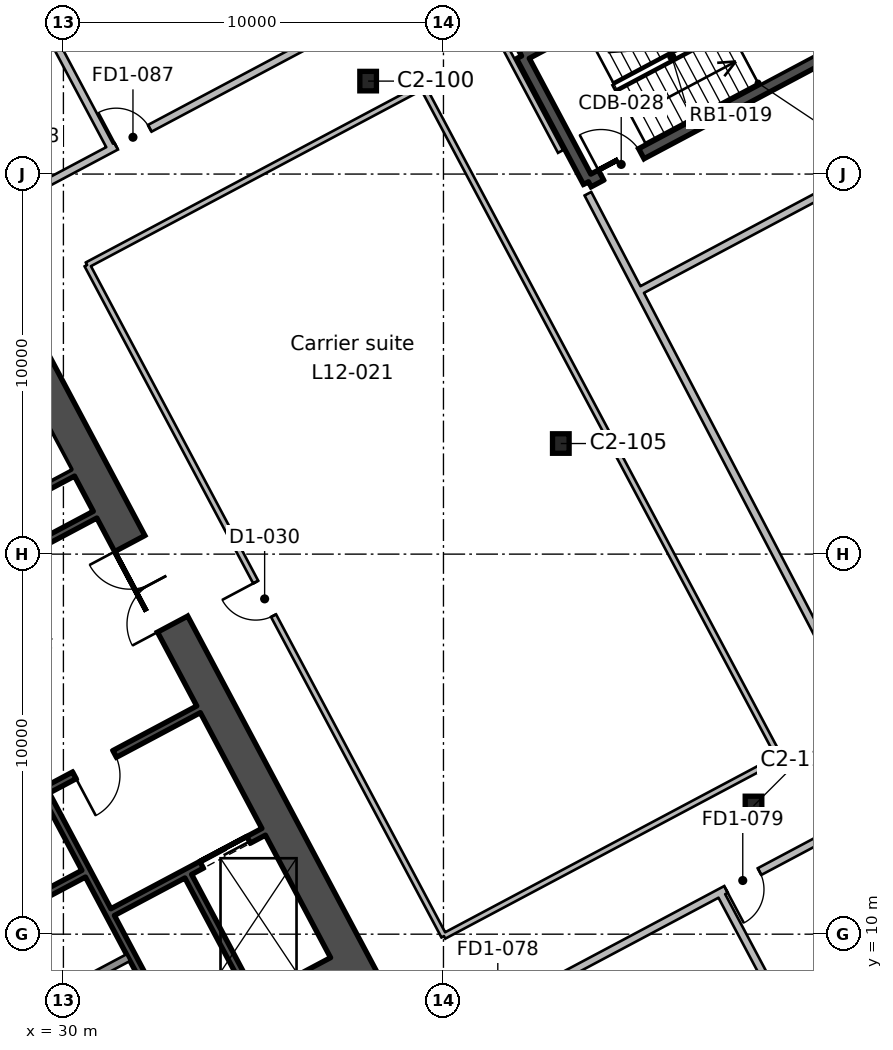
"""IFC4 building model, lengths in metres.
Left out: names, types, materials, properties, quantities, classifications, styles, units other than length and angle.
Written with IfcOpenShell. Run it as: python <this file> out.ifc"""

import sys

from ifc_helpers import new_model, si_unit, direction, frame, frame_2d, origin, origin_2d, place, context, subcontext, project, spatial, rectangle, i_section, extrude, element, fill, save


model = new_model("IFC4")
c1 = context("Model", 3, precision=1e-05, world=origin(), true_north=direction((0.0, 1.0)))
c2 = subcontext(c1, "Body", "Model", "MODEL_VIEW")
j1 = project(units=[si_unit("LENGTHUNIT", "METRE"), si_unit("PLANEANGLEUNIT", "RADIAN")], contexts=[c1])
p1 = place(None, origin())
s1 = spatial("IfcSite", under=j1, at=p1, CompositionType="ELEMENT")
p2 = place(p1, origin())
s2 = spatial("IfcBuilding", under=s1, at=p2, CompositionType="ELEMENT")
p3 = place(p2, frame((0.0, 0.0, 66.2)))
s3 = spatial("IfcBuildingStorey", under=s2, at=p3, CompositionType="ELEMENT", Elevation=66.2)
for number, where, z_axis, x_axis in (
    (1, (48.158, 13.374, 0.0), (0.0, 0.0, 1.0), (1.0, 0.0, 0.0)),
    (2, (43.088, 22.91, 0.0), (0.0, 0.0, 1.0), (1.0, 0.0, 0.0)),
    (3, (38.018, 32.446, 0.0), (0.0, 0.0, 1.0), (1.0, 0.0, 0.0)),
):
    element("IfcColumn", number, at=place(p3, frame(where, z_axis=z_axis, x_axis=x_axis)), inside=s3, PredefinedType="COLUMN", context=c2, shape_type="SweptSolid", body=[
        extrude(i_section(OverallWidth=0.437, OverallDepth=0.513, WebThickness=0.061, FlangeThickness=0.097, FilletRadius=0.015, at=origin_2d()), origin(), (0.0, 0.0, 1.0), 4.6),
    ])
p4 = place(p3, frame((37.849, 8.799, 0.0), z_axis=(0.0, 0.0, 1.0), x_axis=(-0.469465789982, 0.882950662289, 0.0)))
e4 = element("IfcWall", 4, at=p4, inside=s3, PredefinedType="SHEAR", context=c2, shape_type="SweptSolid", body=[
    extrude(rectangle(XDim=20.0, YDim=0.9, at=frame_2d((10.0, 0.0))), origin(), (0.0, 0.0, 1.0), 4.6),
])
p5 = place(p4, frame((10.6, 0.0, 0.0)))
e5 = element("IfcOpeningElement", 5, at=p5, cuts=e4, PredefinedType="OPENING", context=c2, shape_type="SweptSolid", body=[
    extrude(rectangle(XDim=2.4, YDim=2.4, at=frame_2d((1.2, 1.2))), frame((0.0, 0.46, 0.0), z_axis=(0.0, -1.0, 0.0), x_axis=(1.0, 0.0, 0.0)), (0.0, 0.0, 1.0), 0.92),
])
p6 = place(p3, frame((19.405, -0.498, 0.0), z_axis=(0.0, 0.0, 1.0), x_axis=(0.88294509198, 0.469476266226, 0.0)))
e6 = element("IfcWall", 6, at=p6, inside=s3, PredefinedType="SHEAR", context=c2, shape_type="SweptSolid", body=[
    extrude(rectangle(XDim=20.2, YDim=0.9, at=frame_2d((10.1, 0.0))), origin(), (0.0, 0.0, 1.0), 4.6),
])
p7 = place(p3, frame((32.968, 7.223, 0.0), z_axis=(0.0, 0.0, 1.0), x_axis=(-0.469480409012, 0.88294288918, 0.0)))
e7 = element("IfcWall", 7, at=p7, inside=s3, PredefinedType="SHEAR", context=c2, shape_type="SweptSolid", body=[
    extrude(rectangle(XDim=7.3, YDim=0.2, at=frame_2d((3.65, 0.0))), origin(), (0.0, 0.0, 1.0), 4.6),
])
p8 = place(p3, frame((34.999, 8.303, 0.0), z_axis=(0.0, 0.0, 1.0), x_axis=(-0.4694665462, 0.882950260207, 0.0)))
e8 = element("IfcWall", 8, at=p8, inside=s3, PredefinedType="SHEAR", context=c2, shape_type="SweptSolid", body=[
    extrude(rectangle(XDim=3.65, YDim=0.2, at=frame_2d((1.825, 0.0))), origin(), (0.0, 0.0, 1.0), 4.6),
])
p9 = place(p3, frame((27.115, 6.942, 0.0), z_axis=(0.0, 0.0, 1.0), x_axis=(0.882934506056, 0.469496174655, 0.0)))
e9 = element("IfcWall", 9, at=p9, inside=s3, PredefinedType="SOLIDWALL", context=c2, shape_type="SweptSolid", body=[
    extrude(rectangle(XDim=5.2, YDim=0.2, at=frame_2d((2.6, 0.0))), origin(), (0.0, 0.0, 1.0), 4.6),
])
p10 = place(p3, frame((31.296, 10.581, 0.0), z_axis=(0.0, 0.0, 1.0), x_axis=(0.882960433586, 0.469447412093, 0.0)))
e10 = element("IfcWall", 10, at=p10, inside=s3, PredefinedType="SHEAR", context=c2, shape_type="SweptSolid", body=[
    extrude(rectangle(XDim=4.5, YDim=0.2, at=frame_2d((2.25, 0.0))), origin(), (0.0, 0.0, 1.0), 4.6),
])
p11 = place(p10, frame((2.65, 0.0, 0.0)))
e11 = element("IfcOpeningElement", 11, at=p11, cuts=e10, PredefinedType="OPENING", context=c2, shape_type="SweptSolid", body=[
    extrude(rectangle(XDim=1.4, YDim=2.4, at=frame_2d((0.7, 1.2))), frame((0.0, 0.11, 0.0), z_axis=(0.0, -1.0, 0.0), x_axis=(1.0, 0.0, 0.0)), (0.0, 0.0, 1.0), 0.22),
])
p12 = place(p3, frame((25.941, 9.15, 0.0), z_axis=(0.0, 0.0, 1.0), x_axis=(0.882953967957, 0.469459572775, 0.0)))
e12 = element("IfcWall", 12, at=p12, inside=s3, PredefinedType="SHEAR", context=c2, shape_type="SweptSolid", body=[
    extrude(rectangle(XDim=5.2, YDim=0.2, at=frame_2d((2.6, 0.0))), origin(), (0.0, 0.0, 1.0), 4.6),
])
p13 = place(p3, frame((24.726, 11.222, 0.0), z_axis=(0.0, 0.0, 1.0), x_axis=(0.882940221191, 0.469485426614, 0.0)))
e13 = element("IfcWall", 13, at=p13, inside=s3, PredefinedType="SHEAR", context=c2, shape_type="SweptSolid", body=[
    extrude(rectangle(XDim=10.0, YDim=0.2, at=frame_2d((5.0, 0.0))), origin(), (0.0, 0.0, 1.0), 4.6),
])
p14 = place(p13, frame((6.3, 0.0, 0.0)))
e14 = element("IfcOpeningElement", 14, at=p14, cuts=e13, PredefinedType="OPENING", context=c2, shape_type="SweptSolid", body=[
    extrude(rectangle(XDim=1.2, YDim=2.1, at=frame_2d((0.6, 1.05))), frame((0.0, 0.11, 0.0), z_axis=(0.0, -1.0, 0.0), x_axis=(1.0, 0.0, 0.0)), (0.0, 0.0, 1.0), 0.22),
])
p15 = place(p13, frame((0.36, 0.0, 0.0)))
e15 = element("IfcOpeningElement", 15, at=p15, cuts=e13, PredefinedType="OPENING", context=c2, shape_type="SweptSolid", body=[
    extrude(rectangle(XDim=0.9, YDim=2.1, at=frame_2d((0.45, 1.05))), frame((0.0, 0.11, 0.0), z_axis=(0.0, -1.0, 0.0), x_axis=(1.0, 0.0, 0.0)), (0.0, 0.0, 1.0), 0.22),
])
p16 = place(p13, frame((3.06, 0.0, 0.0)))
e16 = element("IfcOpeningElement", 16, at=p16, cuts=e13, PredefinedType="OPENING", context=c2, shape_type="SweptSolid", body=[
    extrude(rectangle(XDim=0.9, YDim=2.1, at=frame_2d((0.45, 1.05))), frame((0.0, 0.11, 0.0), z_axis=(0.0, -1.0, 0.0), x_axis=(1.0, 0.0, 0.0)), (0.0, 0.0, 1.0), 0.22),
])
p17 = place(p3, frame((23.769, 17.282, 0.0), z_axis=(0.0, 0.0, 1.0), x_axis=(0.882940221191, 0.469485426614, 0.0)))
e17 = element("IfcWall", 17, at=p17, inside=s3, PredefinedType="SHEAR", context=c2, shape_type="SweptSolid", body=[
    extrude(rectangle(XDim=8.0, YDim=0.2, at=frame_2d((4.0, 0.0))), origin(), (0.0, 0.0, 1.0), 4.6),
])
p18 = place(p3, frame((23.182, 18.385, 0.0), z_axis=(0.0, 0.0, 1.0), x_axis=(0.88295287151, 0.469461634952, 0.0)))
e18 = element("IfcWall", 18, at=p18, inside=s3, PredefinedType="SHEAR", context=c2, shape_type="SweptSolid", body=[
    extrude(rectangle(XDim=8.0, YDim=0.2, at=frame_2d((4.0, 0.0))), origin(), (0.0, 0.0, 1.0), 4.6),
])
p19 = place(p3, frame((51.145, 33.693, 0.0), z_axis=(0.0, 0.0, 1.0), x_axis=(-0.882945809314, -0.469474917132, 0.0)))
e19 = element("IfcWall", 19, at=p19, inside=s3, PredefinedType="SHEAR", context=c2, shape_type="SweptSolid", body=[
    extrude(rectangle(XDim=8.3, YDim=0.3, at=frame_2d((4.15, 0.0))), origin(), (0.0, 0.0, 1.0), 4.6),
])
p20 = place(p19, frame((6.725, 0.0, 0.0)))
e20 = element("IfcOpeningElement", 20, at=p20, cuts=e19, PredefinedType="OPENING", context=c2, shape_type="SweptSolid", body=[
    extrude(rectangle(XDim=1.2, YDim=2.1, at=frame_2d((0.6, 1.05))), frame((0.0, 0.16, 0.0), z_axis=(0.0, -1.0, 0.0), x_axis=(1.0, 0.0, 0.0)), (0.0, 0.0, 1.0), 0.32),
])
p21 = place(p3, frame((43.816, 29.796, 0.0), z_axis=(0.0, 0.0, 1.0), x_axis=(-0.46946936446, 0.882948761726, 0.0)))
e21 = element("IfcWall", 21, at=p21, inside=s3, PredefinedType="SHEAR", context=c2, shape_type="SweptSolid", body=[
    extrude(rectangle(XDim=3.75, YDim=0.3, at=frame_2d((1.875, 0.0))), origin(), (0.0, 0.0, 1.0), 4.6),
])
p22 = place(p3, frame((42.055, 33.107, 0.0), z_axis=(0.0, 0.0, 1.0), x_axis=(0.882945809314, 0.469474917132, 0.0)))
e22 = element("IfcWall", 22, at=p22, inside=s3, PredefinedType="SHEAR", context=c2, shape_type="SweptSolid", body=[
    extrude(rectangle(XDim=8.3, YDim=0.3, at=frame_2d((4.15, 0.0))), origin(), (0.0, 0.0, 1.0), 4.6),
])
p23 = place(p3, frame((0.0, 14.044, 0.0), z_axis=(0.0, 0.0, 1.0), x_axis=(0.882943219941, 0.469479786955, 0.0)))
e23 = element("IfcWall", 23, at=p23, inside=s3, PredefinedType="PARTITIONING", context=c2, shape_type="SweptSolid", body=[
    extrude(rectangle(XDim=65.607, YDim=0.2, at=frame_2d((32.803, 0.0))), origin(), (0.0, 0.0, 1.0), 4.2),
])
p24 = place(p23, frame((35.55, 0.0, 0.0)))
e24 = element("IfcOpeningElement", 24, at=p24, cuts=e23, PredefinedType="OPENING", context=c2, shape_type="SweptSolid", body=[
    extrude(rectangle(XDim=1.0, YDim=2.1, at=frame_2d((0.5, 1.05))), frame((0.0, 0.11, 0.0), z_axis=(0.0, -1.0, 0.0), x_axis=(1.0, 0.0, 0.0)), (0.0, 0.0, 1.0), 0.22),
])
p25 = place(p23, frame((32.15, 0.0, 0.0)))
e25 = element("IfcOpeningElement", 25, at=p25, cuts=e23, PredefinedType="OPENING", context=c2, shape_type="SweptSolid", body=[
    extrude(rectangle(XDim=1.0, YDim=2.1, at=frame_2d((0.5, 1.05))), frame((0.0, 0.11, 0.0), z_axis=(0.0, -1.0, 0.0), x_axis=(1.0, 0.0, 0.0)), (0.0, 0.0, 1.0), 0.22),
])
p26 = place(p23, frame((13.95, 0.0, 0.0)))
e26 = element("IfcOpeningElement", 26, at=p26, cuts=e23, PredefinedType="OPENING", context=c2, shape_type="SweptSolid", body=[
    extrude(rectangle(XDim=1.0, YDim=2.1, at=frame_2d((0.5, 1.05))), frame((0.0, 0.11, 0.0), z_axis=(0.0, -1.0, 0.0), x_axis=(1.0, 0.0, 0.0)), (0.0, 0.0, 1.0), 0.22),
])
p27 = place(p3, frame((30.249, 32.572, 0.0), z_axis=(0.0, 0.0, 1.0), x_axis=(0.469290296872, -0.883043949791, 0.0)))
e27 = element("IfcWall", 27, at=p27, inside=s3, PredefinedType="PARTITIONING", context=c2, shape_type="SweptSolid", body=[
    extrude(rectangle(XDim=2.158, YDim=0.2, at=frame_2d((1.079, 0.0))), origin(), (0.0, 0.0, 1.0), 4.2),
])
p28 = place(p3, frame((69.57, 22.948, 0.0), z_axis=(0.0, 0.0, 1.0), x_axis=(-0.882939582192, -0.469486628349, 0.0)))
e28 = element("IfcWall", 28, at=p28, inside=s3, PredefinedType="PARTITIONING", context=c2, shape_type="SweptSolid", body=[
    extrude(rectangle(XDim=63.39, YDim=0.2, at=frame_2d((31.695, 0.0))), origin(), (0.0, 0.0, 1.0), 4.2),
])
p29 = place(p28, frame((41.971, 0.0, 0.0)))
e29 = element("IfcOpeningElement", 29, at=p29, cuts=e28, PredefinedType="OPENING", context=c2, shape_type="SweptSolid", body=[
    extrude(rectangle(XDim=1.0, YDim=2.1, at=frame_2d((0.5, 1.05))), frame((0.0, 0.11, 0.0), z_axis=(0.0, -1.0, 0.0), x_axis=(1.0, 0.0, 0.0)), (0.0, 0.0, 1.0), 0.22),
])
p30 = place(p28, frame((31.371, 0.0, 0.0)))
e30 = element("IfcOpeningElement", 30, at=p30, cuts=e28, PredefinedType="OPENING", context=c2, shape_type="SweptSolid", body=[
    extrude(rectangle(XDim=1.0, YDim=2.1, at=frame_2d((0.5, 1.05))), frame((0.0, 0.11, 0.0), z_axis=(0.0, -1.0, 0.0), x_axis=(1.0, 0.0, 0.0)), (0.0, 0.0, 1.0), 0.22),
])
p31 = place(p28, frame((24.071, 0.0, 0.0)))
e31 = element("IfcOpeningElement", 31, at=p31, cuts=e28, PredefinedType="OPENING", context=c2, shape_type="SweptSolid", body=[
    extrude(rectangle(XDim=1.0, YDim=2.1, at=frame_2d((0.5, 1.05))), frame((0.0, 0.11, 0.0), z_axis=(0.0, -1.0, 0.0), x_axis=(1.0, 0.0, 0.0)), (0.0, 0.0, 1.0), 0.22),
])
p32 = place(p28, frame((13.071, 0.0, 0.0)))
e32 = element("IfcOpeningElement", 32, at=p32, cuts=e28, PredefinedType="OPENING", context=c2, shape_type="SweptSolid", body=[
    extrude(rectangle(XDim=1.0, YDim=2.1, at=frame_2d((0.5, 1.05))), frame((0.0, 0.11, 0.0), z_axis=(0.0, -1.0, 0.0), x_axis=(1.0, 0.0, 0.0)), (0.0, 0.0, 1.0), 0.22),
])
p33 = place(p3, frame((30.249, 32.572, 0.0), z_axis=(0.0, 0.0, 1.0), x_axis=(-0.46948710086, 0.882939330943, 0.0)))
e33 = element("IfcWall", 33, at=p33, inside=s3, PredefinedType="PARTITIONING", context=c2, shape_type="SweptSolid", body=[
    extrude(rectangle(XDim=3.442, YDim=0.2, at=frame_2d((1.721, 0.0))), origin(), (0.0, 0.0, 1.0), 4.2),
])
p34 = place(p3, frame((47.278, 11.094, 0.0), z_axis=(0.0, 0.0, 1.0), x_axis=(0.469337789067, -0.883018708609, 0.0)))
e34 = element("IfcWall", 34, at=p34, inside=s3, PredefinedType="PARTITIONING", context=c2, shape_type="SweptSolid", body=[
    extrude(rectangle(XDim=8.799, YDim=0.2, at=frame_2d((4.4, 0.0))), origin(), (0.0, 0.0, 1.0), 4.2),
])
p35 = place(p3, frame((41.572, 33.43, 0.0), z_axis=(0.0, 0.0, 1.0), x_axis=(0.469510863882, -0.882926694974, 0.0)))
e35 = element("IfcWall", 35, at=p35, inside=s3, PredefinedType="PARTITIONING", context=c2, shape_type="SweptSolid", body=[
    extrude(rectangle(XDim=3.212, YDim=0.15, at=frame_2d((1.606, 0.0))), origin(), (0.0, 0.0, 1.0), 4.2),
])
p36 = place(p3, frame((43.801, 29.483, 0.0), z_axis=(0.0, 0.0, 1.0), x_axis=(0.462864260364, -0.886429171721, 0.0)))
e36 = element("IfcWall", 36, at=p36, inside=s3, PredefinedType="PARTITIONING", context=c2, shape_type="SweptSolid", body=[
    extrude(rectangle(XDim=15.469, YDim=0.2, at=frame_2d((7.734, 0.0))), origin(), (0.0, 0.0, 1.0), 4.2),
])
p37 = place(p3, frame((62.542, 36.166, 0.0), z_axis=(0.0, 0.0, 1.0), x_axis=(-0.882962645452, -0.46944325188, 0.0)))
e37 = element("IfcWall", 37, at=p37, inside=s3, PredefinedType="PARTITIONING", context=c2, shape_type="SweptSolid", body=[
    extrude(rectangle(XDim=19.706, YDim=0.2, at=frame_2d((9.853, 0.0))), origin(), (0.0, 0.0, 1.0), 4.2),
])
p38 = place(p3, frame((30.623, 27.608, 0.0), z_axis=(0.0, 0.0, 1.0), x_axis=(0.882940863385, 0.469484218867, 0.0)))
e38 = element("IfcWall", 38, at=p38, inside=s3, PredefinedType="PARTITIONING", context=c2, shape_type="SweptSolid", body=[
    extrude(rectangle(XDim=10.0, YDim=0.15, at=frame_2d((5.0, 0.0))), origin(), (0.0, 0.0, 1.0), 4.2),
])
p39 = place(p3, frame((39.453, 32.303, 0.0), z_axis=(0.0, 0.0, 1.0), x_axis=(0.469461333319, -0.882953031887, 0.0)))
e39 = element("IfcWall", 39, at=p39, inside=s3, PredefinedType="PARTITIONING", context=c2, shape_type="SweptSolid", body=[
    extrude(rectangle(XDim=20.0, YDim=0.15, at=frame_2d((10.0, 0.0))), origin(), (0.0, 0.0, 1.0), 4.2),
])
p40 = place(p3, frame((48.842, 14.644, 0.0), z_axis=(0.0, 0.0, 1.0), x_axis=(-0.882924718888, -0.46951457994, 0.0)))
e40 = element("IfcWall", 40, at=p40, inside=s3, PredefinedType="PARTITIONING", context=c2, shape_type="SweptSolid", body=[
    extrude(rectangle(XDim=10.0, YDim=0.15, at=frame_2d((5.0, 0.0))), origin(), (0.0, 0.0, 1.0), 4.2),
])
p41 = place(p3, frame((40.013, 9.949, 0.0), z_axis=(0.0, 0.0, 1.0), x_axis=(-0.469489882812, 0.882937851685, 0.0)))
e41 = element("IfcWall", 41, at=p41, inside=s3, PredefinedType="PARTITIONING", context=c2, shape_type="SweptSolid", body=[
    extrude(rectangle(XDim=20.0, YDim=0.15, at=frame_2d((10.0, 0.0))), origin(), (0.0, 0.0, 1.0), 4.2),
])
p42 = place(p41, frame((9.55, 0.0, 0.0)))
e42 = element("IfcOpeningElement", 42, at=p42, cuts=e41, PredefinedType="OPENING", context=c2, shape_type="SweptSolid", body=[
    extrude(rectangle(XDim=1.0, YDim=2.1, at=frame_2d((0.5, 1.05))), frame((0.0, 0.085, 0.0), z_axis=(0.0, -1.0, 0.0), x_axis=(1.0, 0.0, 0.0)), (0.0, 0.0, 1.0), 0.17),
])
p43 = place(p5, origin())
e43 = element("IfcDoor", 43, at=p43, inside=s3, OperationType="DOUBLE_DOOR_SINGLE_SWING", PredefinedType="DOOR", context=c2, shape_type="SweptSolid", body=[
    extrude(rectangle(XDim=2.4, YDim=2.4, at=frame_2d((1.2, 1.2))), frame((0.0, 0.025, 0.0), z_axis=(0.0, -1.0, 0.0), x_axis=(1.0, 0.0, 0.0)), (0.0, 0.0, 1.0), 0.05),
])
fill(e5, e43)
p44 = place(p14, frame((1.2, 0.0, 0.0), z_axis=(0.0, 0.0, 1.0), x_axis=(-1.0, 0.0, 0.0)))
e44 = element("IfcDoor", 44, at=p44, inside=s3, OperationType="SINGLE_SWING_RIGHT", PredefinedType="DOOR", context=c2, shape_type="SweptSolid", body=[
    extrude(rectangle(XDim=1.2, YDim=2.1, at=frame_2d((0.6, 1.05))), frame((0.0, 0.025, 0.0), z_axis=(0.0, -1.0, 0.0), x_axis=(1.0, 0.0, 0.0)), (0.0, 0.0, 1.0), 0.05),
])
fill(e14, e44)
p45 = place(p11, origin())
e45 = element("IfcDoor", 45, at=p45, inside=s3, OperationType="DOUBLE_DOOR_SLIDING", PredefinedType="DOOR", context=c2, shape_type="SweptSolid", body=[
    extrude(rectangle(XDim=1.4, YDim=2.4, at=frame_2d((0.7, 1.2))), frame((0.0, 0.025, 0.0), z_axis=(0.0, -1.0, 0.0), x_axis=(1.0, 0.0, 0.0)), (0.0, 0.0, 1.0), 0.05),
])
fill(e11, e45)
p46 = place(p20, frame((1.2, 0.0, 0.0), z_axis=(0.0, 0.0, 1.0), x_axis=(-1.0, 0.0, 0.0)))
e46 = element("IfcDoor", 46, at=p46, inside=s3, OperationType="SINGLE_SWING_LEFT", PredefinedType="DOOR", context=c2, shape_type="SweptSolid", body=[
    extrude(rectangle(XDim=1.2, YDim=2.1, at=frame_2d((0.6, 1.05))), frame((0.0, 0.025, 0.0), z_axis=(0.0, -1.0, 0.0), x_axis=(1.0, 0.0, 0.0)), (0.0, 0.0, 1.0), 0.05),
])
fill(e20, e46)
p47 = place(p24, origin())
e47 = element("IfcDoor", 47, at=p47, inside=s3, OperationType="SINGLE_SWING_LEFT", PredefinedType="DOOR", context=c2, shape_type="SweptSolid", body=[
    extrude(rectangle(XDim=1.0, YDim=2.1, at=frame_2d((0.5, 1.05))), frame((0.0, 0.025, 0.0), z_axis=(0.0, -1.0, 0.0), x_axis=(1.0, 0.0, 0.0)), (0.0, 0.0, 1.0), 0.05),
])
fill(e24, e47)
p48 = place(p31, origin())
e48 = element("IfcDoor", 48, at=p48, inside=s3, OperationType="SINGLE_SWING_RIGHT", PredefinedType="DOOR", context=c2, shape_type="SweptSolid", body=[
    extrude(rectangle(XDim=1.0, YDim=2.1, at=frame_2d((0.5, 1.05))), frame((0.0, 0.025, 0.0), z_axis=(0.0, -1.0, 0.0), x_axis=(1.0, 0.0, 0.0)), (0.0, 0.0, 1.0), 0.05),
])
fill(e31, e48)
p49 = place(p42, origin())
e49 = element("IfcDoor", 49, at=p49, inside=s3, OperationType="SINGLE_SWING_RIGHT", PredefinedType="DOOR", context=c2, shape_type="SweptSolid", body=[
    extrude(rectangle(XDim=1.0, YDim=2.1, at=frame_2d((0.5, 1.05))), frame((0.0, 0.025, 0.0), z_axis=(0.0, -1.0, 0.0), x_axis=(1.0, 0.0, 0.0)), (0.0, 0.0, 1.0), 0.05),
])
fill(e42, e49)
save(model, sys.argv[1])
